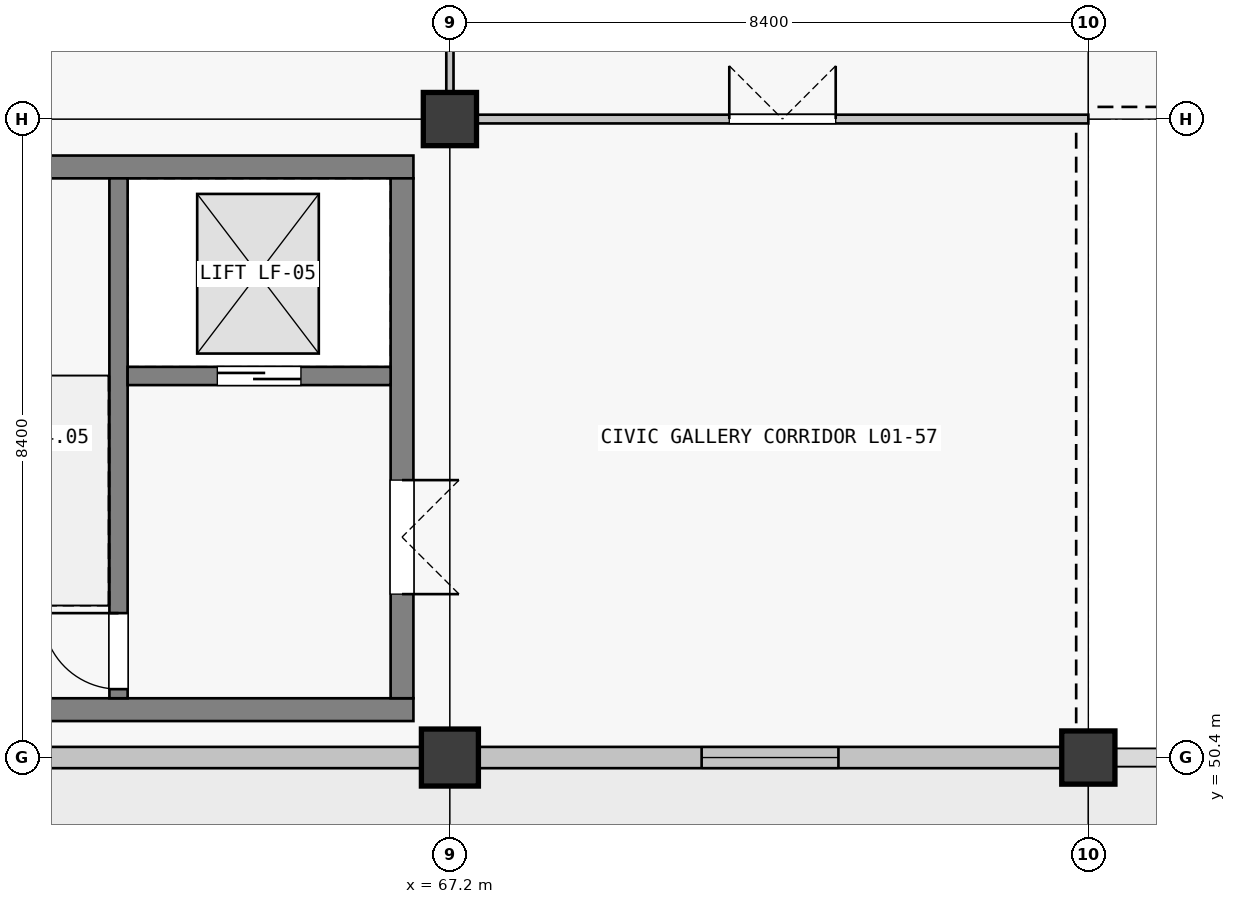
"""IFC4 building model, lengths in metres.
Left out: names, types, materials, properties, quantities, classifications, styles, units other than length and angle.
Written with IfcOpenShell. Run it as: python <this file> out.ifc"""

import sys

from ifc_helpers import new_model, si_unit, direction, frame, frame_2d, origin, origin_2d, place, context, subcontext, project, spatial, rectangle, extrude, element, fill, save


model = new_model("IFC4")
c1 = context("Model", 3, precision=1e-05, world=origin(), true_north=direction((0.0, 1.0)))
c2 = subcontext(c1, "Body", "Model", "MODEL_VIEW")
j1 = project(units=[si_unit("LENGTHUNIT", "METRE"), si_unit("PLANEANGLEUNIT", "RADIAN")], contexts=[c1])
p1 = place(None, origin())
s1 = spatial("IfcSite", under=j1, at=p1, CompositionType="ELEMENT")
p2 = place(p1, origin())
s2 = spatial("IfcBuilding", under=s1, at=p2, CompositionType="ELEMENT")
p3 = place(p2, frame((0.0, 0.0, 5.76)))
s3 = spatial("IfcBuildingStorey", under=s2, at=p3, CompositionType="ELEMENT", Elevation=5.76)
p4 = place(p3, frame((67.2, 50.4, 0.0), z_axis=(0.0, 0.0, 1.0), x_axis=(1.0, 0.0, 0.0)))
e1 = element("IfcColumn", 1, at=p4, inside=s3, PredefinedType="COLUMN", context=c2, shape_type="SweptSolid", body=[
    extrude(rectangle(XDim=0.75, YDim=0.75, at=origin_2d()), origin(), (0.0, 0.0, 1.0), 4.5),
])
for number, where, z_axis, x_axis in (
    (2, (67.2, 58.8, 0.0), (0.0, 0.0, 1.0), (1.0, 0.0, 0.0)),
    (3, (75.6, 50.4, 0.0), (0.0, 0.0, 1.0), (1.0, 0.0, 0.0)),
):
    element("IfcColumn", number, at=place(p3, frame(where, z_axis=z_axis, x_axis=x_axis)), inside=s3, PredefinedType="COLUMN", context=c2, shape_type="SweptSolid", body=[
        extrude(rectangle(XDim=0.7, YDim=0.7, at=origin_2d()), origin(), (0.0, 0.0, 1.0), 4.5),
    ])
p5 = place(p3, frame((66.824, 50.4, 0.0), z_axis=(0.0, 0.0, 1.0), x_axis=(-1.0, 0.0, 0.0)))
e4 = element("IfcWall", 4, at=p5, inside=s3, PredefinedType="SOLIDWALL", context=c2, shape_type="SweptSolid", body=[
    extrude(rectangle(XDim=7.673, YDim=0.28, at=frame_2d((3.836, 0.0))), origin(), (0.0, 0.0, 1.0), 3.4),
])
p6 = place(p3, frame((75.249, 50.4, 0.0), z_axis=(0.0, 0.0, 1.0), x_axis=(-1.0, 0.0, 0.0)))
e5 = element("IfcWall", 5, at=p6, inside=s3, PredefinedType="SOLIDWALL", context=c2, shape_type="SweptSolid", body=[
    extrude(rectangle(XDim=7.673, YDim=0.28, at=frame_2d((3.836, 0.0))), origin(), (0.0, 0.0, 1.0), 3.4),
])
p7 = place(p6, frame((2.937, 0.0, 0.9)))
e6 = element("IfcOpeningElement", 6, at=p7, cuts=e5, PredefinedType="OPENING", context=c2, shape_type="SweptSolid", body=[
    extrude(rectangle(XDim=1.8, YDim=1.8, at=frame_2d((0.9, 0.9))), frame((0.0, 0.14, 0.0), z_axis=(0.0, -1.0, 0.0), x_axis=(1.0, 0.0, 0.0)), (0.0, 0.0, 1.0), 0.28),
])
for number, where, z_axis, x_axis in (
    (7, (66.72, 51.03, 0.0), (0.0, 0.0, 1.0), (-1.0, 0.0, 0.0)),
    (8, (59.28, 58.17, 0.0), (0.0, 0.0, 1.0), (1.0, 0.0, 0.0)),
):
    element("IfcWall", number, at=place(p3, frame(where, z_axis=z_axis, x_axis=x_axis)), inside=s3, PredefinedType="SHEAR", context=c2, shape_type="SweptSolid", body=[
        extrude(rectangle(XDim=7.44, YDim=0.3, at=frame_2d((3.72, 0.0))), origin(), (0.0, 0.0, 1.0), 4.5),
    ])
p8 = place(p3, frame((66.57, 58.02, 0.0), z_axis=(0.0, 0.0, 1.0), x_axis=(0.0, -1.0, 0.0)))
e9 = element("IfcWall", 9, at=p8, inside=s3, PredefinedType="SHEAR", context=c2, shape_type="SweptSolid", body=[
    extrude(rectangle(XDim=6.84, YDim=0.3, at=frame_2d((3.42, 0.0))), origin(), (0.0, 0.0, 1.0), 4.5),
])
p9 = place(p8, frame((3.97, 0.0, 0.0)))
e10 = element("IfcOpeningElement", 10, at=p9, cuts=e9, PredefinedType="OPENING", context=c2, shape_type="SweptSolid", body=[
    extrude(rectangle(XDim=1.5, YDim=2.15, at=frame_2d((0.75, 1.075))), frame((0.0, 0.15, 0.0), z_axis=(0.0, -1.0, 0.0), x_axis=(1.0, 0.0, 0.0)), (0.0, 0.0, 1.0), 0.3),
])
p10 = place(p3, frame((62.84, 51.18, 0.0), z_axis=(0.0, 0.0, 1.0), x_axis=(0.0, 1.0, 0.0)))
e11 = element("IfcWall", 11, at=p10, inside=s3, PredefinedType="SHEAR", context=c2, shape_type="SweptSolid", body=[
    extrude(rectangle(XDim=6.84, YDim=0.24, at=frame_2d((3.42, 0.0))), origin(), (0.0, 0.0, 1.0), 4.5),
])
p11 = place(p10, frame((0.12, 0.0, 0.0)))
e12 = element("IfcOpeningElement", 12, at=p11, cuts=e11, PredefinedType="OPENING", context=c2, shape_type="SweptSolid", body=[
    extrude(rectangle(XDim=1.0, YDim=2.15, at=frame_2d((0.5, 1.075))), frame((0.0, 0.12, 0.0), z_axis=(0.0, -1.0, 0.0), x_axis=(1.0, 0.0, 0.0)), (0.0, 0.0, 1.0), 0.24),
])
p12 = place(p3, frame((62.96, 55.42, 0.0), z_axis=(0.0, 0.0, 1.0), x_axis=(1.0, 0.0, 0.0)))
e13 = element("IfcWall", 13, at=p12, inside=s3, PredefinedType="SHEAR", context=c2, shape_type="SweptSolid", body=[
    extrude(rectangle(XDim=3.46, YDim=0.24, at=frame_2d((1.73, 0.0))), origin(), (0.0, 0.0, 1.0), 4.5),
])
p13 = place(p12, frame((1.18, 0.0, 0.0)))
e14 = element("IfcOpeningElement", 14, at=p13, cuts=e13, PredefinedType="OPENING", context=c2, shape_type="SweptSolid", body=[
    extrude(rectangle(XDim=1.1, YDim=2.15, at=frame_2d((0.55, 1.075))), frame((0.0, 0.12, 0.0), z_axis=(0.0, -1.0, 0.0), x_axis=(1.0, 0.0, 0.0)), (0.0, 0.0, 1.0), 0.24),
])
p14 = place(p3, frame((67.552, 58.8, 0.0), z_axis=(0.0, 0.0, 1.0), x_axis=(1.0, 0.0, 0.0)))
e15 = element("IfcWall", 15, at=p14, inside=s3, PredefinedType="PARTITIONING", context=c2, shape_type="SweptSolid", body=[
    extrude(rectangle(XDim=8.048, YDim=0.115, at=frame_2d((4.024, 0.0))), origin(), (0.0, 0.0, 1.0), 2.4),
])
p15 = place(p14, frame((3.324, 0.0, 0.0)))
e16 = element("IfcOpeningElement", 16, at=p15, cuts=e15, PredefinedType="OPENING", context=c2, shape_type="SweptSolid", body=[
    extrude(rectangle(XDim=1.4, YDim=2.22, at=frame_2d((0.7, 1.11))), frame((0.0, 0.058, 0.0), z_axis=(0.0, -1.0, 0.0), x_axis=(1.0, 0.0, 0.0)), (0.0, 0.0, 1.0), 0.115),
])
p16 = place(p3, frame((67.2, 59.152, 0.0), z_axis=(0.0, 0.0, 1.0), x_axis=(0.0, 1.0, 0.0)))
e17 = element("IfcWall", 17, at=p16, inside=s3, PredefinedType="PARTITIONING", context=c2, shape_type="SweptSolid", body=[
    extrude(rectangle(XDim=7.671, YDim=0.095, at=frame_2d((3.835, 0.0))), origin(), (0.0, 0.0, 1.0), 2.4),
])
p17 = place(p16, frame((3.086, 0.0, 0.0)))
e18 = element("IfcOpeningElement", 18, at=p17, cuts=e17, PredefinedType="OPENING", context=c2, shape_type="SweptSolid", body=[
    extrude(rectangle(XDim=1.5, YDim=2.22, at=frame_2d((0.75, 1.11))), frame((0.0, 0.047, 0.0), z_axis=(0.0, -1.0, 0.0), x_axis=(1.0, 0.0, 0.0)), (0.0, 0.0, 1.0), 0.095),
])
p18 = place(p7, origin())
e19 = element("IfcWindow", 19, at=p18, inside=s3, PartitioningType="SINGLE_PANEL", PredefinedType="WINDOW", context=c2, shape_type="SweptSolid", body=[
    extrude(rectangle(XDim=1.8, YDim=1.8, at=frame_2d((0.9, 0.9))), frame((0.0, 0.03, 0.0), z_axis=(0.0, -1.0, 0.0), x_axis=(1.0, 0.0, 0.0)), (0.0, 0.0, 1.0), 0.06),
])
fill(e6, e19)
p19 = place(p11, origin())
e20 = element("IfcDoor", 20, at=p19, inside=s3, OperationType="SINGLE_SWING_RIGHT", PredefinedType="DOOR", context=c2, shape_type="SweptSolid", body=[
    extrude(rectangle(XDim=1.0, YDim=2.15, at=frame_2d((0.5, 1.075))), frame((0.0, 0.025, 0.0), z_axis=(0.0, -1.0, 0.0), x_axis=(1.0, 0.0, 0.0)), (0.0, 0.0, 1.0), 0.05),
])
fill(e12, e20)
p20 = place(p9, origin())
e21 = element("IfcDoor", 21, at=p20, inside=s3, OperationType="DOUBLE_DOOR_SINGLE_SWING", PredefinedType="DOOR", context=c2, shape_type="SweptSolid", body=[
    extrude(rectangle(XDim=1.5, YDim=2.15, at=frame_2d((0.75, 1.075))), frame((0.0, 0.025, 0.0), z_axis=(0.0, -1.0, 0.0), x_axis=(1.0, 0.0, 0.0)), (0.0, 0.0, 1.0), 0.05),
])
fill(e10, e21)
p21 = place(p13, origin())
e22 = element("IfcDoor", 22, at=p21, inside=s3, OperationType="DOUBLE_DOOR_SLIDING", PredefinedType="DOOR", context=c2, shape_type="SweptSolid", body=[
    extrude(rectangle(XDim=1.1, YDim=2.15, at=frame_2d((0.55, 1.075))), frame((0.0, 0.025, 0.0), z_axis=(0.0, -1.0, 0.0), x_axis=(1.0, 0.0, 0.0)), (0.0, 0.0, 1.0), 0.05),
])
fill(e14, e22)
p22 = place(p15, origin())
e23 = element("IfcDoor", 23, at=p22, inside=s3, OperationType="DOUBLE_DOOR_SINGLE_SWING", PredefinedType="DOOR", context=c2, shape_type="SweptSolid", body=[
    extrude(rectangle(XDim=1.4, YDim=2.22, at=frame_2d((0.7, 1.11))), frame((0.0, 0.025, 0.0), z_axis=(0.0, -1.0, 0.0), x_axis=(1.0, 0.0, 0.0)), (0.0, 0.0, 1.0), 0.05),
])
fill(e16, e23)
save(model, sys.argv[1])
